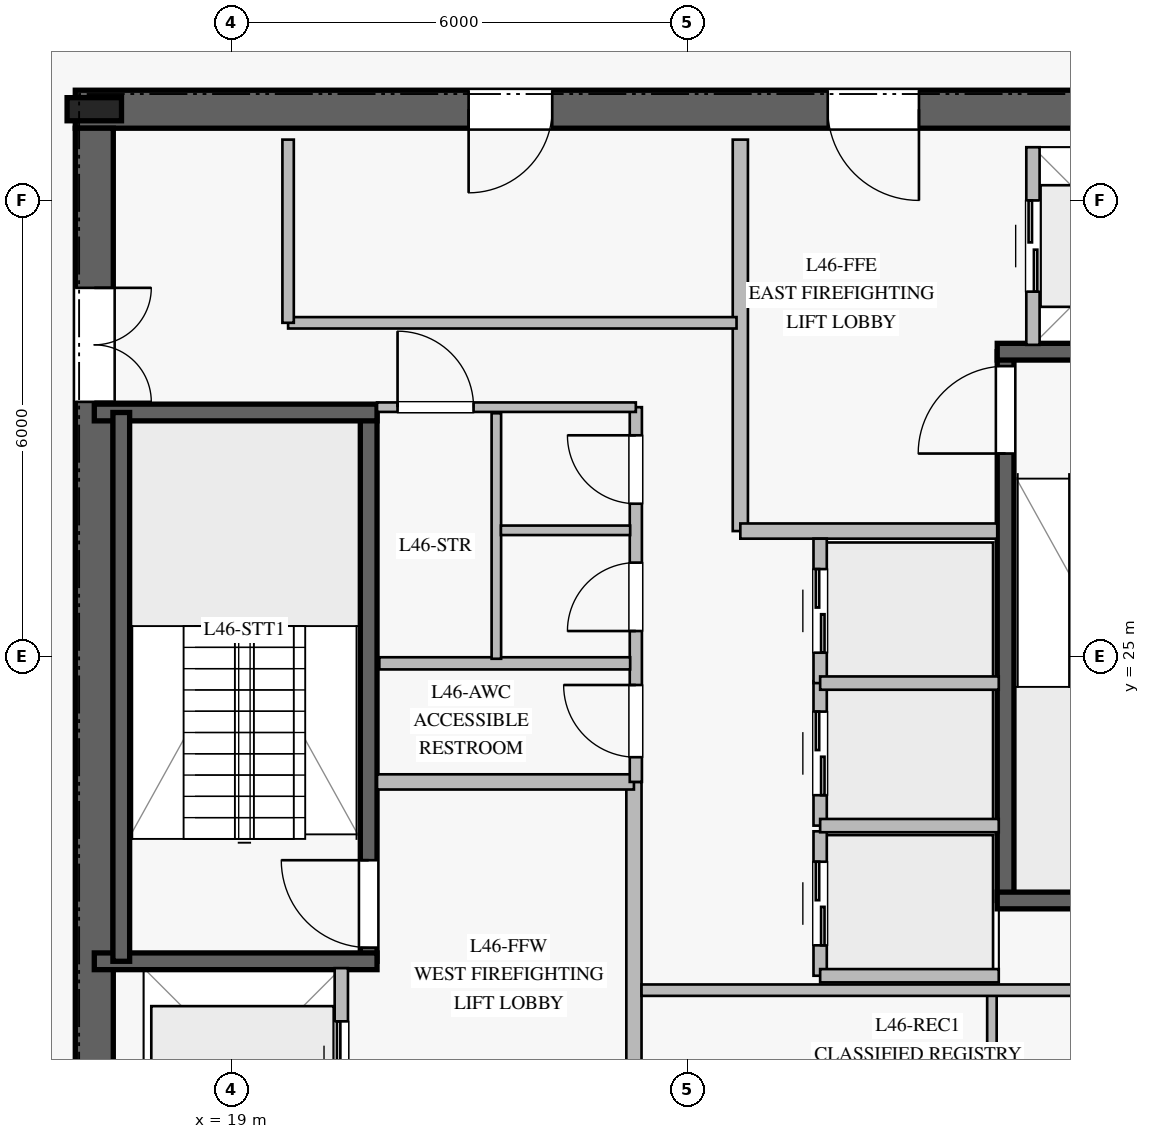
"""IFC4 building model, lengths in metres.
Left out: names, types, materials, properties, quantities, classifications, styles, units other than length and angle.
Written with IfcOpenShell. Run it as: python <this file> out.ifc"""

import sys

from ifc_helpers import new_model, si_unit, direction, frame, frame_2d, origin, origin_2d, place, context, subcontext, project, spatial, rectangle, i_section, extrude, element, fill, save


model = new_model("IFC4")
c1 = context("Model", 3, precision=1e-05, world=origin(), true_north=direction((0.0, 1.0)))
c2 = subcontext(c1, "Body", "Model", "MODEL_VIEW")
j1 = project(units=[si_unit("LENGTHUNIT", "METRE"), si_unit("PLANEANGLEUNIT", "RADIAN")], contexts=[c1])
p1 = place(None, origin())
s1 = spatial("IfcSite", under=j1, at=p1, CompositionType="ELEMENT")
p2 = place(p1, origin())
s2 = spatial("IfcBuilding", under=s1, at=p2, CompositionType="ELEMENT")
p3 = place(p2, frame((0.0, 0.0, 192.8)))
s3 = spatial("IfcBuildingStorey", under=s2, at=p3, CompositionType="ELEMENT", Elevation=192.8)
p4 = place(p3, frame((33.05, 32.2, 0.0), z_axis=(0.0, 0.0, 1.0), x_axis=(-1.0, 0.0, 0.0)))
e1 = element("IfcWall", 1, at=p4, inside=s3, PredefinedType="SHEAR", context=c2, shape_type="SweptSolid", body=[
    extrude(rectangle(XDim=16.1, YDim=0.5, at=frame_2d((8.05, 0.0))), origin(), (0.0, 0.0, 1.0), 3.78),
])
p5 = place(p4, frame((5.0, 0.0, 0.0)))
e2 = element("IfcOpeningElement", 2, at=p5, cuts=e1, PredefinedType="OPENING", context=c2, shape_type="SweptSolid", body=[
    extrude(rectangle(XDim=1.2, YDim=2.25, at=frame_2d((0.6, 1.125))), frame((0.0, 0.26, 0.0), z_axis=(0.0, -1.0, 0.0), x_axis=(1.0, 0.0, 0.0)), (0.0, 0.0, 1.0), 0.52),
])
p6 = place(p4, frame((9.825, 0.0, 0.0)))
e3 = element("IfcOpeningElement", 3, at=p6, cuts=e1, PredefinedType="OPENING", context=c2, shape_type="SweptSolid", body=[
    extrude(rectangle(XDim=1.1, YDim=2.2, at=frame_2d((0.55, 1.1))), frame((0.0, 0.26, 0.0), z_axis=(0.0, -1.0, 0.0), x_axis=(1.0, 0.0, 0.0)), (0.0, 0.0, 1.0), 0.52),
])
p7 = place(p3, frame((17.2, 31.95, 0.0), z_axis=(0.0, 0.0, 1.0), x_axis=(0.0, -1.0, 0.0)))
e4 = element("IfcWall", 4, at=p7, inside=s3, PredefinedType="SHEAR", context=c2, shape_type="SweptSolid", body=[
    extrude(rectangle(XDim=13.9, YDim=0.5, at=frame_2d((6.95, 0.0))), origin(), (0.0, 0.0, 1.0), 3.78),
])
p8 = place(p7, frame((2.1, 0.0, 0.0)))
e5 = element("IfcOpeningElement", 5, at=p8, cuts=e4, PredefinedType="OPENING", context=c2, shape_type="SweptSolid", body=[
    extrude(rectangle(XDim=1.5, YDim=2.2, at=frame_2d((0.75, 1.1))), frame((0.0, 0.26, 0.0), z_axis=(0.0, -1.0, 0.0), x_axis=(1.0, 0.0, 0.0)), (0.0, 0.0, 1.0), 0.52),
])
p9 = place(p3, frame((17.2, 32.2, 0.0), z_axis=(0.0, 0.0, 1.0), x_axis=(1.0, 0.0, 0.0)))
e6 = element("IfcColumn", 6, at=p9, inside=s3, PredefinedType="COLUMN", context=c2, shape_type="SweptSolid", body=[
    extrude(i_section(OverallWidth=0.304, OverallDepth=0.716, WebThickness=0.021, FlangeThickness=0.04, at=origin_2d()), origin(), (0.0, 0.0, 1.0), 4.0),
])
p10 = place(p3, frame((20.81, 20.99, 0.0), z_axis=(0.0, 0.0, 1.0), x_axis=(0.0, 1.0, 0.0)))
e7 = element("IfcWall", 7, at=p10, inside=s3, PredefinedType="SOLIDWALL", context=c2, shape_type="SweptSolid", body=[
    extrude(rectangle(XDim=7.22, YDim=0.22, at=frame_2d((3.61, 0.0))), origin(), (0.0, 0.0, 1.0), 3.78),
])
p11 = place(p10, frame((0.18, 0.0, 0.0)))
e8 = element("IfcOpeningElement", 8, at=p11, cuts=e7, PredefinedType="OPENING", context=c2, shape_type="SweptSolid", body=[
    extrude(rectangle(XDim=1.15, YDim=2.2, at=frame_2d((0.575, 1.1))), frame((0.0, 0.12, 0.0), z_axis=(0.0, -1.0, 0.0), x_axis=(1.0, 0.0, 0.0)), (0.0, 0.0, 1.0), 0.24),
])
for number, where, z_axis, x_axis in (
    (9, (17.2, 20.99, 0.0), (0.0, 0.0, 1.0), (1.0, 0.0, 0.0)),
    (10, (17.2, 28.21, 0.0), (0.0, 0.0, 1.0), (1.0, 0.0, 0.0)),
):
    element("IfcWall", number, at=place(p3, frame(where, z_axis=z_axis, x_axis=x_axis)), inside=s3, PredefinedType="SOLIDWALL", context=c2, shape_type="SweptSolid", body=[
        extrude(rectangle(XDim=3.72, YDim=0.22, at=frame_2d((1.86, 0.0))), origin(), (0.0, 0.0, 1.0), 3.78),
    ])
p12 = place(p3, frame((17.555, 28.21, 0.0), z_axis=(0.0, 0.0, 1.0), x_axis=(0.0, -1.0, 0.0)))
e11 = element("IfcWall", 11, at=p12, inside=s3, PredefinedType="SOLIDWALL", context=c2, shape_type="SweptSolid", body=[
    extrude(rectangle(XDim=7.22, YDim=0.22, at=frame_2d((3.61, 0.0))), origin(), (0.0, 0.0, 1.0), 3.78),
])
p13 = place(p3, frame((29.19, 21.79, 0.0), z_axis=(0.0, 0.0, 1.0), x_axis=(0.0, 1.0, 0.0)))
e12 = element("IfcWall", 12, at=p13, inside=s3, PredefinedType="SOLIDWALL", context=c2, shape_type="SweptSolid", body=[
    extrude(rectangle(XDim=7.22, YDim=0.22, at=frame_2d((3.61, 0.0))), origin(), (0.0, 0.0, 1.0), 3.78),
])
p14 = place(p13, frame((5.88, 0.0, 0.0)))
e13 = element("IfcOpeningElement", 13, at=p14, cuts=e12, PredefinedType="OPENING", context=c2, shape_type="SweptSolid", body=[
    extrude(rectangle(XDim=1.15, YDim=2.2, at=frame_2d((0.575, 1.1))), frame((0.0, 0.12, 0.0), z_axis=(0.0, -1.0, 0.0), x_axis=(1.0, 0.0, 0.0)), (0.0, 0.0, 1.0), 0.24),
])
for number, where, z_axis, x_axis in (
    (14, (29.08, 21.79, 0.0), (0.0, 0.0, 1.0), (1.0, 0.0, 0.0)),
    (15, (29.08, 29.01, 0.0), (0.0, 0.0, 1.0), (1.0, 0.0, 0.0)),
):
    element("IfcWall", number, at=place(p3, frame(where, z_axis=z_axis, x_axis=x_axis)), inside=s3, PredefinedType="SOLIDWALL", context=c2, shape_type="SweptSolid", body=[
        extrude(rectangle(XDim=3.72, YDim=0.22, at=frame_2d((1.86, 0.0))), origin(), (0.0, 0.0, 1.0), 3.78),
    ])
p15 = place(p3, frame((24.3, 18.2, 0.0), z_axis=(0.0, 0.0, 1.0), x_axis=(0.0, 1.0, 0.0)))
e16 = element("IfcWall", 16, at=p15, inside=s3, PredefinedType="PARTITIONING", context=c2, shape_type="SweptSolid", body=[
    extrude(rectangle(XDim=5.15, YDim=0.2, at=frame_2d((2.575, 0.0))), origin(), (0.0, 0.0, 1.0), 3.78),
])
p16 = place(p3, frame((20.92, 23.35, 0.0), z_axis=(0.0, 0.0, 1.0), x_axis=(1.0, 0.0, 0.0)))
e17 = element("IfcWall", 17, at=p16, inside=s3, PredefinedType="PARTITIONING", context=c2, shape_type="SweptSolid", body=[
    extrude(rectangle(XDim=3.38, YDim=0.2, at=frame_2d((1.69, 0.0))), origin(), (0.0, 0.0, 1.0), 3.78),
])
p17 = place(p3, frame((25.7, 26.65, 0.0), z_axis=(0.0, 0.0, 1.0), x_axis=(0.0, 1.0, 0.0)))
e18 = element("IfcWall", 18, at=p17, inside=s3, PredefinedType="PARTITIONING", context=c2, shape_type="SweptSolid", body=[
    extrude(rectangle(XDim=5.15, YDim=0.2, at=frame_2d((2.575, 0.0))), origin(), (0.0, 0.0, 1.0), 3.78),
])
p18 = place(p3, frame((25.7, 26.65, 0.0), z_axis=(0.0, 0.0, 1.0), x_axis=(1.0, 0.0, 0.0)))
e19 = element("IfcWall", 19, at=p18, inside=s3, PredefinedType="PARTITIONING", context=c2, shape_type="SweptSolid", body=[
    extrude(rectangle(XDim=3.38, YDim=0.2, at=frame_2d((1.69, 0.0))), origin(), (0.0, 0.0, 1.0), 3.78),
])
p19 = place(p3, frame((24.325, 23.35, 0.0), z_axis=(0.0, 0.0, 1.0), x_axis=(0.0, 1.0, 0.0)))
e20 = element("IfcWall", 20, at=p19, inside=s3, PredefinedType="PLUMBINGWALL", context=c2, shape_type="SweptSolid", body=[
    extrude(rectangle(XDim=4.93, YDim=0.16, at=frame_2d((2.465, 0.0))), origin(), (0.0, 0.0, 1.0), 3.78),
])
p20 = place(p19, frame((0.325, 0.0, 0.0)))
e21 = element("IfcOpeningElement", 21, at=p20, cuts=e20, PredefinedType="OPENING", context=c2, shape_type="SweptSolid", body=[
    extrude(rectangle(XDim=0.95, YDim=2.1, at=frame_2d((0.475, 1.05))), frame((0.0, 0.09, 0.0), z_axis=(0.0, -1.0, 0.0), x_axis=(1.0, 0.0, 0.0)), (0.0, 0.0, 1.0), 0.18),
])
p21 = place(p19, frame((1.985, 0.0, 0.0)))
e22 = element("IfcOpeningElement", 22, at=p21, cuts=e20, PredefinedType="OPENING", context=c2, shape_type="SweptSolid", body=[
    extrude(rectangle(XDim=0.9, YDim=2.1, at=frame_2d((0.45, 1.05))), frame((0.0, 0.09, 0.0), z_axis=(0.0, -1.0, 0.0), x_axis=(1.0, 0.0, 0.0)), (0.0, 0.0, 1.0), 0.18),
])
p22 = place(p19, frame((3.66, 0.0, 0.0)))
e23 = element("IfcOpeningElement", 23, at=p22, cuts=e20, PredefinedType="OPENING", context=c2, shape_type="SweptSolid", body=[
    extrude(rectangle(XDim=0.9, YDim=2.1, at=frame_2d((0.45, 1.05))), frame((0.0, 0.09, 0.0), z_axis=(0.0, -1.0, 0.0), x_axis=(1.0, 0.0, 0.0)), (0.0, 0.0, 1.0), 0.18),
])
p23 = place(p3, frame((20.92, 28.28, 0.0), z_axis=(0.0, 0.0, 1.0), x_axis=(1.0, 0.0, 0.0)))
e24 = element("IfcWall", 24, at=p23, inside=s3, PredefinedType="PARTITIONING", context=c2, shape_type="SweptSolid", body=[
    extrude(rectangle(XDim=3.405, YDim=0.125, at=frame_2d((1.703, 0.0))), origin(), (0.0, 0.0, 1.0), 3.78),
])
p24 = place(p23, frame((0.27, 0.0, 0.0)))
e25 = element("IfcOpeningElement", 25, at=p24, cuts=e24, PredefinedType="OPENING", context=c2, shape_type="SweptSolid", body=[
    extrude(rectangle(XDim=1.0, YDim=2.15, at=frame_2d((0.5, 1.075))), frame((0.0, 0.073, 0.0), z_axis=(0.0, -1.0, 0.0), x_axis=(1.0, 0.0, 0.0)), (0.0, 0.0, 1.0), 0.145),
])
p25 = place(p3, frame((29.01, 18.05, 0.0), z_axis=(0.0, 0.0, 1.0), x_axis=(0.0, 1.0, 0.0)))
e26 = element("IfcWall", 26, at=p25, inside=s3, PredefinedType="PARTITIONING", context=c2, shape_type="SweptSolid", body=[
    extrude(rectangle(XDim=2.5, YDim=0.125, at=frame_2d((1.25, 0.0))), origin(), (0.0, 0.0, 1.0), 3.78),
])
p26 = place(p3, frame((20.95, 24.91, 0.0), z_axis=(0.0, 0.0, 1.0), x_axis=(1.0, 0.0, 0.0)))
e27 = element("IfcWall", 27, at=p26, inside=s3, PredefinedType="PLUMBINGWALL", context=c2, shape_type="SweptSolid", body=[
    extrude(rectangle(XDim=3.3, YDim=0.16, at=frame_2d((1.65, 0.0))), origin(), (0.0, 0.0, 1.0), 3.78),
])
p27 = place(p3, frame((22.49, 24.97, 0.0), z_axis=(0.0, 0.0, 1.0), x_axis=(0.0, 1.0, 0.0)))
e28 = element("IfcWall", 28, at=p27, inside=s3, PredefinedType="PARTITIONING", context=c2, shape_type="SweptSolid", body=[
    extrude(rectangle(XDim=3.23, YDim=0.125, at=frame_2d((1.615, 0.0))), origin(), (0.0, 0.0, 1.0), 3.78),
])
p28 = place(p3, frame((22.55, 26.66, 0.0), z_axis=(0.0, 0.0, 1.0), x_axis=(1.0, 0.0, 0.0)))
e29 = element("IfcWall", 29, at=p28, inside=s3, PredefinedType="PARTITIONING", context=c2, shape_type="SweptSolid", body=[
    extrude(rectangle(XDim=1.7, YDim=0.125, at=frame_2d((0.85, 0.0))), origin(), (0.0, 0.0, 1.0), 3.78),
])
p29 = place(p3, frame((24.4, 20.61, 0.0), z_axis=(0.0, 0.0, 1.0), x_axis=(1.0, 0.0, 0.0)))
e30 = element("IfcWall", 30, at=p29, inside=s3, PredefinedType="PARTITIONING", context=c2, shape_type="SweptSolid", body=[
    extrude(rectangle(XDim=5.9, YDim=0.15, at=frame_2d((2.95, 0.0))), origin(), (0.0, 0.0, 1.0), 3.78),
])
p30 = place(p3, frame((19.75, 29.39, 0.0), z_axis=(0.0, 0.0, 1.0), x_axis=(1.0, 0.0, 0.0)))
e31 = element("IfcWall", 31, at=p30, inside=s3, PredefinedType="PARTITIONING", context=c2, shape_type="SweptSolid", body=[
    extrude(rectangle(XDim=5.9, YDim=0.15, at=frame_2d((2.95, 0.0))), origin(), (0.0, 0.0, 1.0), 3.78),
])
p31 = place(p3, frame((19.75, 29.39, 0.0), z_axis=(0.0, 0.0, 1.0), x_axis=(0.0, 1.0, 0.0)))
e32 = element("IfcWall", 32, at=p31, inside=s3, PredefinedType="PARTITIONING", context=c2, shape_type="SweptSolid", body=[
    extrude(rectangle(XDim=2.41, YDim=0.15, at=frame_2d((1.205, 0.0))), origin(), (0.0, 0.0, 1.0), 3.78),
])
p32 = place(p3, frame((26.75, 20.8, 0.0), z_axis=(0.0, 0.0, 1.0), x_axis=(0.0, 1.0, 0.0)))
e33 = element("IfcWall", 33, at=p32, inside=s3, PredefinedType="PARTITIONING", context=c2, shape_type="SweptSolid", body=[
    extrude(rectangle(XDim=1.9, YDim=0.175, at=frame_2d((0.95, 0.0))), origin(), (0.0, 0.0, 1.0), 3.78),
])
p33 = place(p32, frame((0.4, 0.0, 0.0)))
e34 = element("IfcOpeningElement", 34, at=p33, cuts=e33, PredefinedType="OPENING", context=c2, shape_type="SweptSolid", body=[
    extrude(rectangle(XDim=1.1, YDim=2.2, at=frame_2d((0.55, 1.1))), frame((0.0, 0.098, 0.0), z_axis=(0.0, -1.0, 0.0), x_axis=(1.0, 0.0, 0.0)), (0.0, 0.0, 1.0), 0.195),
])
p34 = place(p3, frame((26.75, 20.8, 0.0), z_axis=(0.0, 0.0, 1.0), x_axis=(1.0, 0.0, 0.0)))
e35 = element("IfcWall", 35, at=p34, inside=s3, PredefinedType="PARTITIONING", context=c2, shape_type="SweptSolid", body=[
    extrude(rectangle(XDim=2.35, YDim=0.175, at=frame_2d((1.175, 0.0))), origin(), (0.0, 0.0, 1.0), 3.78),
])
p35 = place(p3, frame((26.75, 22.775, 0.0), z_axis=(0.0, 0.0, 1.0), x_axis=(0.0, 1.0, 0.0)))
e36 = element("IfcWall", 36, at=p35, inside=s3, PredefinedType="PARTITIONING", context=c2, shape_type="SweptSolid", body=[
    extrude(rectangle(XDim=1.9, YDim=0.175, at=frame_2d((0.95, 0.0))), origin(), (0.0, 0.0, 1.0), 3.78),
])
p36 = place(p35, frame((0.4, 0.0, 0.0)))
e37 = element("IfcOpeningElement", 37, at=p36, cuts=e36, PredefinedType="OPENING", context=c2, shape_type="SweptSolid", body=[
    extrude(rectangle(XDim=1.1, YDim=2.2, at=frame_2d((0.55, 1.1))), frame((0.0, 0.098, 0.0), z_axis=(0.0, -1.0, 0.0), x_axis=(1.0, 0.0, 0.0)), (0.0, 0.0, 1.0), 0.195),
])
p37 = place(p3, frame((26.75, 22.775, 0.0), z_axis=(0.0, 0.0, 1.0), x_axis=(1.0, 0.0, 0.0)))
e38 = element("IfcWall", 38, at=p37, inside=s3, PredefinedType="PARTITIONING", context=c2, shape_type="SweptSolid", body=[
    extrude(rectangle(XDim=2.35, YDim=0.175, at=frame_2d((1.175, 0.0))), origin(), (0.0, 0.0, 1.0), 3.78),
])
p38 = place(p3, frame((26.75, 24.65, 0.0), z_axis=(0.0, 0.0, 1.0), x_axis=(0.0, 1.0, 0.0)))
e39 = element("IfcWall", 39, at=p38, inside=s3, PredefinedType="PARTITIONING", context=c2, shape_type="SweptSolid", body=[
    extrude(rectangle(XDim=1.9, YDim=0.175, at=frame_2d((0.95, 0.0))), origin(), (0.0, 0.0, 1.0), 3.78),
])
p39 = place(p38, frame((0.4, 0.0, 0.0)))
e40 = element("IfcOpeningElement", 40, at=p39, cuts=e39, PredefinedType="OPENING", context=c2, shape_type="SweptSolid", body=[
    extrude(rectangle(XDim=1.1, YDim=2.2, at=frame_2d((0.55, 1.1))), frame((0.0, 0.098, 0.0), z_axis=(0.0, -1.0, 0.0), x_axis=(1.0, 0.0, 0.0)), (0.0, 0.0, 1.0), 0.195),
])
p40 = place(p3, frame((26.75, 24.65, 0.0), z_axis=(0.0, 0.0, 1.0), x_axis=(1.0, 0.0, 0.0)))
e41 = element("IfcWall", 41, at=p40, inside=s3, PredefinedType="PARTITIONING", context=c2, shape_type="SweptSolid", body=[
    extrude(rectangle(XDim=2.35, YDim=0.175, at=frame_2d((1.175, 0.0))), origin(), (0.0, 0.0, 1.0), 3.78),
])
p41 = place(p3, frame((20.45, 18.3, 0.0), z_axis=(0.0, 0.0, 1.0), x_axis=(0.0, 1.0, 0.0)))
e42 = element("IfcWall", 42, at=p41, inside=s3, PredefinedType="PARTITIONING", context=c2, shape_type="SweptSolid", body=[
    extrude(rectangle(XDim=2.6, YDim=0.175, at=frame_2d((1.3, 0.0))), origin(), (0.0, 0.0, 1.0), 3.78),
])
p42 = place(p41, frame((0.7, 0.0, 0.0)))
e43 = element("IfcOpeningElement", 43, at=p42, cuts=e42, PredefinedType="OPENING", context=c2, shape_type="SweptSolid", body=[
    extrude(rectangle(XDim=1.2, YDim=2.2, at=frame_2d((0.6, 1.1))), frame((0.0, 0.098, 0.0), z_axis=(0.0, -1.0, 0.0), x_axis=(1.0, 0.0, 0.0)), (0.0, 0.0, 1.0), 0.195),
])
p43 = place(p3, frame((29.55, 29.1, 0.0), z_axis=(0.0, 0.0, 1.0), x_axis=(0.0, 1.0, 0.0)))
e44 = element("IfcWall", 44, at=p43, inside=s3, PredefinedType="PARTITIONING", context=c2, shape_type="SweptSolid", body=[
    extrude(rectangle(XDim=2.6, YDim=0.175, at=frame_2d((1.3, 0.0))), origin(), (0.0, 0.0, 1.0), 3.78),
])
p44 = place(p43, frame((0.7, 0.0, 0.0)))
e45 = element("IfcOpeningElement", 45, at=p44, cuts=e44, PredefinedType="OPENING", context=c2, shape_type="SweptSolid", body=[
    extrude(rectangle(XDim=1.2, YDim=2.2, at=frame_2d((0.6, 1.1))), frame((0.0, 0.098, 0.0), z_axis=(0.0, -1.0, 0.0), x_axis=(1.0, 0.0, 0.0)), (0.0, 0.0, 1.0), 0.195),
])
p45 = place(p11, origin())
e46 = element("IfcDoor", 46, at=p45, inside=s3, OperationType="SINGLE_SWING_RIGHT", PredefinedType="DOOR", context=c2, shape_type="SweptSolid", body=[
    extrude(rectangle(XDim=1.15, YDim=2.2, at=frame_2d((0.575, 1.1))), frame((0.0, 0.025, 0.0), z_axis=(0.0, -1.0, 0.0), x_axis=(1.0, 0.0, 0.0)), (0.0, 0.0, 1.0), 0.05),
])
fill(e8, e46)
p46 = place(p14, origin())
e47 = element("IfcDoor", 47, at=p46, inside=s3, OperationType="SINGLE_SWING_LEFT", PredefinedType="DOOR", context=c2, shape_type="SweptSolid", body=[
    extrude(rectangle(XDim=1.15, YDim=2.2, at=frame_2d((0.575, 1.1))), frame((0.0, 0.025, 0.0), z_axis=(0.0, -1.0, 0.0), x_axis=(1.0, 0.0, 0.0)), (0.0, 0.0, 1.0), 0.05),
])
fill(e13, e47)
p47 = place(p5, origin())
e48 = element("IfcDoor", 48, at=p47, inside=s3, OperationType="SINGLE_SWING_LEFT", PredefinedType="DOOR", context=c2, shape_type="SweptSolid", body=[
    extrude(rectangle(XDim=1.2, YDim=2.25, at=frame_2d((0.6, 1.125))), frame((0.0, 0.025, 0.0), z_axis=(0.0, -1.0, 0.0), x_axis=(1.0, 0.0, 0.0)), (0.0, 0.0, 1.0), 0.05),
])
fill(e2, e48)
p48 = place(p8, origin())
e49 = element("IfcDoor", 49, at=p48, inside=s3, OperationType="DOUBLE_DOOR_SINGLE_SWING", PredefinedType="DOOR", context=c2, shape_type="SweptSolid", body=[
    extrude(rectangle(XDim=1.5, YDim=2.2, at=frame_2d((0.75, 1.1))), frame((0.0, 0.025, 0.0), z_axis=(0.0, -1.0, 0.0), x_axis=(1.0, 0.0, 0.0)), (0.0, 0.0, 1.0), 0.05),
])
fill(e5, e49)
p49 = place(p20, origin())
e50 = element("IfcDoor", 50, at=p49, inside=s3, OperationType="SINGLE_SWING_RIGHT", PredefinedType="DOOR", context=c2, shape_type="SweptSolid", body=[
    extrude(rectangle(XDim=0.95, YDim=2.1, at=frame_2d((0.475, 1.05))), frame((0.0, 0.025, 0.0), z_axis=(0.0, -1.0, 0.0), x_axis=(1.0, 0.0, 0.0)), (0.0, 0.0, 1.0), 0.05),
])
fill(e21, e50)
p50 = place(p21, origin())
e51 = element("IfcDoor", 51, at=p50, inside=s3, OperationType="SINGLE_SWING_LEFT", PredefinedType="DOOR", context=c2, shape_type="SweptSolid", body=[
    extrude(rectangle(XDim=0.9, YDim=2.1, at=frame_2d((0.45, 1.05))), frame((0.0, 0.025, 0.0), z_axis=(0.0, -1.0, 0.0), x_axis=(1.0, 0.0, 0.0)), (0.0, 0.0, 1.0), 0.05),
])
fill(e22, e51)
p51 = place(p22, origin())
e52 = element("IfcDoor", 52, at=p51, inside=s3, OperationType="SINGLE_SWING_RIGHT", PredefinedType="DOOR", context=c2, shape_type="SweptSolid", body=[
    extrude(rectangle(XDim=0.9, YDim=2.1, at=frame_2d((0.45, 1.05))), frame((0.0, 0.025, 0.0), z_axis=(0.0, -1.0, 0.0), x_axis=(1.0, 0.0, 0.0)), (0.0, 0.0, 1.0), 0.05),
])
fill(e23, e52)
p52 = place(p24, origin())
e53 = element("IfcDoor", 53, at=p52, inside=s3, OperationType="SINGLE_SWING_LEFT", PredefinedType="DOOR", context=c2, shape_type="SweptSolid", body=[
    extrude(rectangle(XDim=1.0, YDim=2.15, at=frame_2d((0.5, 1.075))), frame((0.0, 0.025, 0.0), z_axis=(0.0, -1.0, 0.0), x_axis=(1.0, 0.0, 0.0)), (0.0, 0.0, 1.0), 0.05),
])
fill(e25, e53)
p53 = place(p6, origin())
e54 = element("IfcDoor", 54, at=p53, inside=s3, OperationType="SINGLE_SWING_RIGHT", PredefinedType="DOOR", context=c2, shape_type="SweptSolid", body=[
    extrude(rectangle(XDim=1.1, YDim=2.2, at=frame_2d((0.55, 1.1))), frame((0.0, 0.025, 0.0), z_axis=(0.0, -1.0, 0.0), x_axis=(1.0, 0.0, 0.0)), (0.0, 0.0, 1.0), 0.05),
])
fill(e3, e54)
p54 = place(p33, origin())
e55 = element("IfcDoor", 55, at=p54, inside=s3, OperationType="DOUBLE_DOOR_SLIDING", PredefinedType="DOOR", context=c2, shape_type="SweptSolid", body=[
    extrude(rectangle(XDim=1.1, YDim=2.2, at=frame_2d((0.55, 1.1))), frame((0.0, 0.025, 0.0), z_axis=(0.0, -1.0, 0.0), x_axis=(1.0, 0.0, 0.0)), (0.0, 0.0, 1.0), 0.05),
])
fill(e34, e55)
p55 = place(p36, origin())
e56 = element("IfcDoor", 56, at=p55, inside=s3, OperationType="DOUBLE_DOOR_SLIDING", PredefinedType="DOOR", context=c2, shape_type="SweptSolid", body=[
    extrude(rectangle(XDim=1.1, YDim=2.2, at=frame_2d((0.55, 1.1))), frame((0.0, 0.025, 0.0), z_axis=(0.0, -1.0, 0.0), x_axis=(1.0, 0.0, 0.0)), (0.0, 0.0, 1.0), 0.05),
])
fill(e37, e56)
p56 = place(p39, origin())
e57 = element("IfcDoor", 57, at=p56, inside=s3, OperationType="DOUBLE_DOOR_SLIDING", PredefinedType="DOOR", context=c2, shape_type="SweptSolid", body=[
    extrude(rectangle(XDim=1.1, YDim=2.2, at=frame_2d((0.55, 1.1))), frame((0.0, 0.025, 0.0), z_axis=(0.0, -1.0, 0.0), x_axis=(1.0, 0.0, 0.0)), (0.0, 0.0, 1.0), 0.05),
])
fill(e40, e57)
p57 = place(p42, origin())
e58 = element("IfcDoor", 58, at=p57, inside=s3, OperationType="DOUBLE_DOOR_SLIDING", PredefinedType="DOOR", context=c2, shape_type="SweptSolid", body=[
    extrude(rectangle(XDim=1.2, YDim=2.2, at=frame_2d((0.6, 1.1))), frame((0.0, 0.025, 0.0), z_axis=(0.0, -1.0, 0.0), x_axis=(1.0, 0.0, 0.0)), (0.0, 0.0, 1.0), 0.05),
])
fill(e43, e58)
p58 = place(p44, origin())
e59 = element("IfcDoor", 59, at=p58, inside=s3, OperationType="DOUBLE_DOOR_SLIDING", PredefinedType="DOOR", context=c2, shape_type="SweptSolid", body=[
    extrude(rectangle(XDim=1.2, YDim=2.2, at=frame_2d((0.6, 1.1))), frame((0.0, 0.025, 0.0), z_axis=(0.0, -1.0, 0.0), x_axis=(1.0, 0.0, 0.0)), (0.0, 0.0, 1.0), 0.05),
])
fill(e45, e59)
save(model, sys.argv[1])
